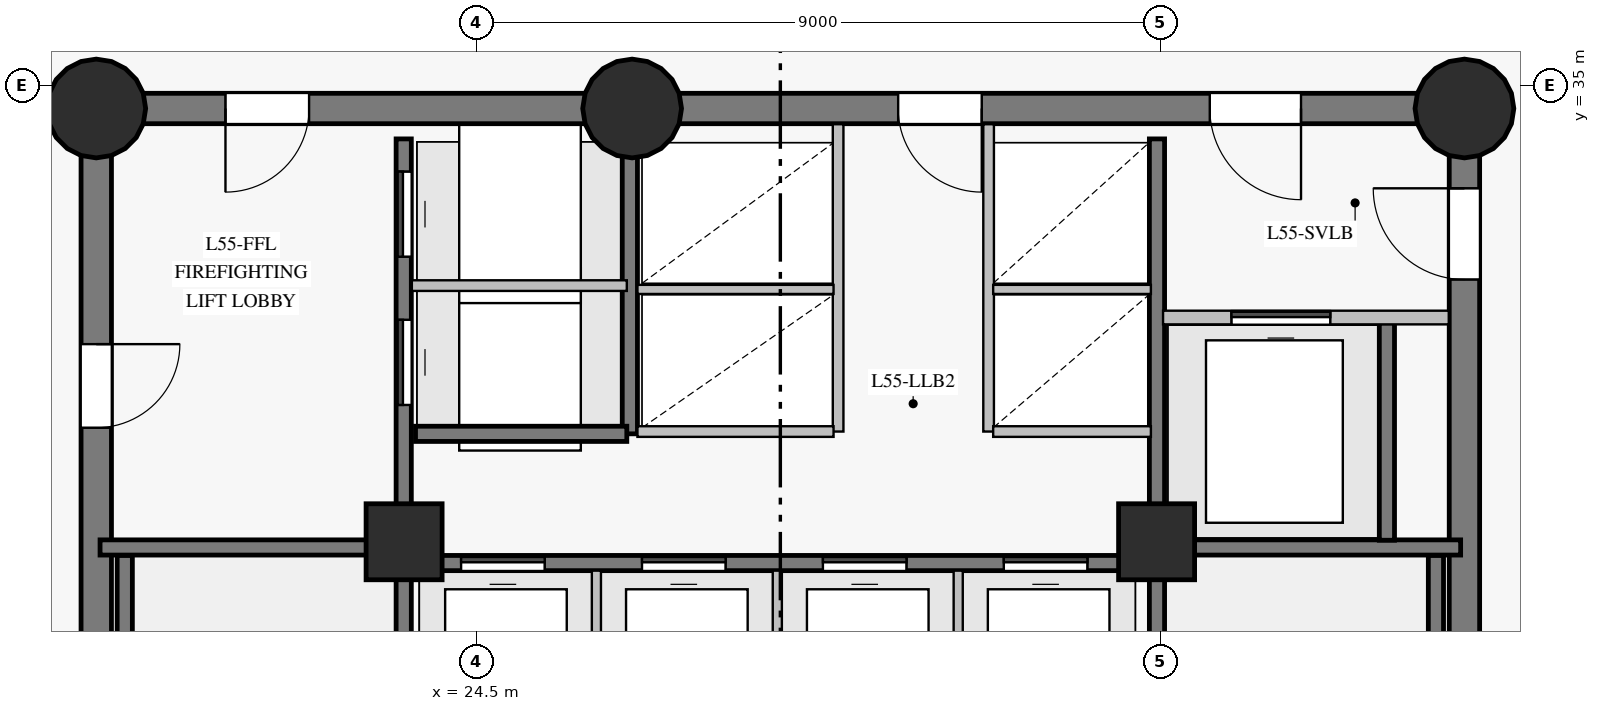
"""IFC4 building model, lengths in metres.
Left out: names, types, materials, properties, quantities, classifications, styles, units other than length and angle.
Written with IfcOpenShell. Run it as: python <this file> out.ifc"""

import sys

from ifc_helpers import new_model, si_unit, direction, frame, frame_2d, origin, origin_with_axes, origin_2d, place, context, subcontext, project, spatial, rectangle, circle, extrude, source, transform, mapped, element, fill, save


model = new_model("IFC4")
c1 = context("Model", 3, precision=1e-05, world=origin(), true_north=direction((0.0, 1.0)))
c2 = subcontext(c1, "Body", "Model", "MODEL_VIEW")
j1 = project(units=[si_unit("LENGTHUNIT", "METRE"), si_unit("PLANEANGLEUNIT", "RADIAN")], contexts=[c1])
p1 = place(None, origin())
s1 = spatial("IfcSite", under=j1, at=p1, CompositionType="ELEMENT")
p2 = place(p1, origin())
s2 = spatial("IfcBuilding", under=s1, at=p2, CompositionType="ELEMENT")
p3 = place(p2, frame((0.0, 0.0, 190.1)))
s3 = spatial("IfcBuildingStorey", under=s2, at=p3, CompositionType="ELEMENT", Elevation=190.1)
p4 = place(p3, frame((37.5, 18.3, 0.0), z_axis=(0.0, 0.0, 1.0), x_axis=(0.0, 1.0, 0.0)))
e1 = element("IfcWall", 1, at=p4, inside=s3, PredefinedType="SHEAR", context=c2, shape_type="SweptSolid", body=[
    extrude(rectangle(XDim=16.4, YDim=0.4, at=frame_2d((8.2, 0.0))), origin(), (0.0, 0.0, 1.0), 2.825),
])
p5 = place(p4, frame((14.15, 0.0, 0.0)))
e2 = element("IfcOpeningElement", 2, at=p5, cuts=e1, PredefinedType="OPENING", context=c2, shape_type="SweptSolid", body=[
    extrude(rectangle(XDim=1.2, YDim=2.15, at=frame_2d((0.6, 1.075))), frame((0.0, 0.21, 0.0), z_axis=(0.0, -1.0, 0.0), x_axis=(1.0, 0.0, 0.0)), (0.0, 0.0, 1.0), 0.42),
])
p6 = place(p3, frame((37.5, 34.7, 0.0), z_axis=(0.0, 0.0, 1.0), x_axis=(-1.0, 0.0, 0.0)))
e3 = element("IfcWall", 3, at=p6, inside=s3, PredefinedType="SHEAR", context=c2, shape_type="SweptSolid", body=[
    extrude(rectangle(XDim=10.95, YDim=0.4, at=frame_2d((5.475, 0.0))), origin(), (0.0, 0.0, 1.0), 2.825),
])
p7 = place(p6, frame((2.15, 0.0, 0.0)))
e4 = element("IfcOpeningElement", 4, at=p7, cuts=e3, PredefinedType="OPENING", context=c2, shape_type="SweptSolid", body=[
    extrude(rectangle(XDim=1.2, YDim=2.15, at=frame_2d((0.6, 1.075))), frame((0.0, 0.21, 0.0), z_axis=(0.0, -1.0, 0.0), x_axis=(1.0, 0.0, 0.0)), (0.0, 0.0, 1.0), 0.42),
])
p8 = place(p6, frame((6.35, 0.0, 0.0)))
e5 = element("IfcOpeningElement", 5, at=p8, cuts=e3, PredefinedType="OPENING", context=c2, shape_type="SweptSolid", body=[
    extrude(rectangle(XDim=1.1, YDim=2.15, at=frame_2d((0.55, 1.075))), frame((0.0, 0.21, 0.0), z_axis=(0.0, -1.0, 0.0), x_axis=(1.0, 0.0, 0.0)), (0.0, 0.0, 1.0), 0.42),
])
p9 = place(p3, frame((26.55, 34.7, 0.0), z_axis=(0.0, 0.0, 1.0), x_axis=(-1.0, 0.0, 0.0)))
e6 = element("IfcWall", 6, at=p9, inside=s3, PredefinedType="SHEAR", context=c2, shape_type="SweptSolid", body=[
    extrude(rectangle(XDim=7.05, YDim=0.4, at=frame_2d((3.525, 0.0))), origin(), (0.0, 0.0, 1.0), 2.825),
])
p10 = place(p9, frame((4.25, 0.0, 0.0)))
e7 = element("IfcOpeningElement", 7, at=p10, cuts=e6, PredefinedType="OPENING", context=c2, shape_type="SweptSolid", body=[
    extrude(rectangle(XDim=1.1, YDim=2.15, at=frame_2d((0.55, 1.075))), frame((0.0, 0.21, 0.0), z_axis=(0.0, -1.0, 0.0), x_axis=(1.0, 0.0, 0.0)), (0.0, 0.0, 1.0), 0.42),
])
p11 = place(p3, frame((19.5, 34.7, 0.0), z_axis=(0.0, 0.0, 1.0), x_axis=(0.0, -1.0, 0.0)))
e8 = element("IfcWall", 8, at=p11, inside=s3, PredefinedType="SHEAR", context=c2, shape_type="SweptSolid", body=[
    extrude(rectangle(XDim=16.4, YDim=0.4, at=frame_2d((8.2, 0.0))), origin(), (0.0, 0.0, 1.0), 2.825),
])
p12 = place(p11, frame((3.1, 0.0, 0.0)))
e9 = element("IfcOpeningElement", 9, at=p12, cuts=e8, PredefinedType="OPENING", context=c2, shape_type="SweptSolid", body=[
    extrude(rectangle(XDim=1.1, YDim=2.15, at=frame_2d((0.55, 1.075))), frame((0.0, 0.21, 0.0), z_axis=(0.0, -1.0, 0.0), x_axis=(1.0, 0.0, 0.0)), (0.0, 0.0, 1.0), 0.42),
])
m1 = source(origin_with_axes(), c2, "Body", "SweptSolid", [
    extrude(circle(Radius=0.65, at=origin_2d()), origin(), (0.0, 0.0, 1.0), 3.05),
])
for number, where, z_axis, x_axis in (
    (10, (19.5, 34.7, 0.0), (0.0, 0.0, 1.0), (1.0, 0.0, 0.0)),
    (11, (26.55, 34.7, 0.0), (0.0, 0.0, 1.0), (1.0, 0.0, 0.0)),
    (12, (37.5, 34.7, 0.0), (0.0, 0.0, 1.0), (1.0, 0.0, 0.0)),
):
    element("IfcColumn", number, at=place(p3, frame(where, z_axis=z_axis, x_axis=x_axis)), inside=s3, PredefinedType="COLUMN", context=c2, shape_type="MappedRepresentation", body=[
        mapped(m1, transform((0.0, 0.0, 0.0), scale=1.0)),
    ])
m2 = source(origin_with_axes(), c2, "Body", "SweptSolid", [
    extrude(rectangle(XDim=1.0, YDim=1.0, at=origin_2d()), origin(), (0.0, 0.0, 1.0), 3.05),
])
for number, where, z_axis, x_axis in (
    (13, (23.55, 29.0, 0.0), (0.0, 0.0, 1.0), (1.0, 0.0, 0.0)),
    (14, (33.45, 29.0, 0.0), (0.0, 0.0, 1.0), (1.0, 0.0, 0.0)),
):
    element("IfcColumn", number, at=place(p3, frame(where, z_axis=z_axis, x_axis=x_axis)), inside=s3, PredefinedType="COLUMN", context=c2, shape_type="MappedRepresentation", body=[
        mapped(m2, transform((0.0, 0.0, 0.0), scale=1.0)),
    ])
p13 = place(p3, frame((23.545, 18.7, 0.0), z_axis=(0.0, 0.0, 1.0), x_axis=(0.0, 1.0, 0.0)))
e15 = element("IfcWall", 15, at=p13, inside=s3, PredefinedType="SHEAR", context=c2, shape_type="SweptSolid", body=[
    extrude(rectangle(XDim=15.6, YDim=0.2, at=frame_2d((7.8, 0.0))), origin(), (0.0, 0.0, 1.0), 2.825),
])
p14 = place(p13, frame((2.75, 0.0, 0.0)))
e16 = element("IfcOpeningElement", 16, at=p14, cuts=e15, PredefinedType="OPENING", context=c2, shape_type="SweptSolid", body=[
    extrude(rectangle(XDim=1.15, YDim=2.15, at=frame_2d((0.575, 1.075))), frame((0.0, 0.11, 0.0), z_axis=(0.0, -1.0, 0.0), x_axis=(1.0, 0.0, 0.0)), (0.0, 0.0, 1.0), 0.22),
])
p15 = place(p13, frame((0.14, 0.0, 0.0)))
e17 = element("IfcOpeningElement", 17, at=p15, cuts=e15, PredefinedType="OPENING", context=c2, shape_type="SweptSolid", body=[
    extrude(rectangle(XDim=0.88, YDim=2.1, at=frame_2d((0.44, 1.05))), frame((0.0, 0.11, 0.0), z_axis=(0.0, -1.0, 0.0), x_axis=(1.0, 0.0, 0.0)), (0.0, 0.0, 1.0), 0.22),
])
p16 = place(p13, frame((1.36, 0.0, 0.0)))
e18 = element("IfcOpeningElement", 18, at=p16, cuts=e15, PredefinedType="OPENING", context=c2, shape_type="SweptSolid", body=[
    extrude(rectangle(XDim=0.88, YDim=2.1, at=frame_2d((0.44, 1.05))), frame((0.0, 0.11, 0.0), z_axis=(0.0, -1.0, 0.0), x_axis=(1.0, 0.0, 0.0)), (0.0, 0.0, 1.0), 0.22),
])
p17 = place(p13, frame((12.1, 0.0, 0.0)))
e19 = element("IfcOpeningElement", 19, at=p17, cuts=e15, PredefinedType="OPENING", context=c2, shape_type="SweptSolid", body=[
    extrude(rectangle(XDim=1.12, YDim=2.15, at=frame_2d((0.56, 1.075))), frame((0.0, 0.11, 0.0), z_axis=(0.0, -1.0, 0.0), x_axis=(1.0, 0.0, 0.0)), (0.0, 0.0, 1.0), 0.22),
])
p18 = place(p13, frame((14.05, 0.0, 0.0)))
e20 = element("IfcOpeningElement", 20, at=p18, cuts=e15, PredefinedType="OPENING", context=c2, shape_type="SweptSolid", body=[
    extrude(rectangle(XDim=1.12, YDim=2.15, at=frame_2d((0.56, 1.075))), frame((0.0, 0.11, 0.0), z_axis=(0.0, -1.0, 0.0), x_axis=(1.0, 0.0, 0.0)), (0.0, 0.0, 1.0), 0.22),
])
p19 = place(p3, frame((33.455, 18.7, 0.0), z_axis=(0.0, 0.0, 1.0), x_axis=(0.0, 1.0, 0.0)))
e21 = element("IfcWall", 21, at=p19, inside=s3, PredefinedType="SHEAR", context=c2, shape_type="SweptSolid", body=[
    extrude(rectangle(XDim=15.6, YDim=0.2, at=frame_2d((7.8, 0.0))), origin(), (0.0, 0.0, 1.0), 2.825),
])
p20 = place(p19, frame((2.75, 0.0, 0.0)))
e22 = element("IfcOpeningElement", 22, at=p20, cuts=e21, PredefinedType="OPENING", context=c2, shape_type="SweptSolid", body=[
    extrude(rectangle(XDim=1.15, YDim=2.15, at=frame_2d((0.575, 1.075))), frame((0.0, 0.11, 0.0), z_axis=(0.0, -1.0, 0.0), x_axis=(1.0, 0.0, 0.0)), (0.0, 0.0, 1.0), 0.22),
])
p21 = place(p19, frame((0.55, 0.0, 0.0)))
e23 = element("IfcOpeningElement", 23, at=p21, cuts=e21, PredefinedType="OPENING", context=c2, shape_type="SweptSolid", body=[
    extrude(rectangle(XDim=0.94, YDim=2.1, at=frame_2d((0.47, 1.05))), frame((0.0, 0.11, 0.0), z_axis=(0.0, -1.0, 0.0), x_axis=(1.0, 0.0, 0.0)), (0.0, 0.0, 1.0), 0.22),
])
p22 = place(p3, frame((23.7, 28.72, 0.0), z_axis=(0.0, 0.0, 1.0), x_axis=(1.0, 0.0, 0.0)))
e24 = element("IfcWall", 24, at=p22, inside=s3, PredefinedType="SHEAR", context=c2, shape_type="SweptSolid", body=[
    extrude(rectangle(XDim=9.6, YDim=0.2, at=frame_2d((4.8, 0.0))), origin(), (0.0, 0.0, 1.0), 2.825),
])
p23 = place(p22, frame((0.6, 0.0, 0.0)))
e25 = element("IfcOpeningElement", 25, at=p23, cuts=e24, PredefinedType="OPENING", context=c2, shape_type="SweptSolid", body=[
    extrude(rectangle(XDim=1.1, YDim=2.15, at=frame_2d((0.55, 1.075))), frame((0.0, 0.11, 0.0), z_axis=(0.0, -1.0, 0.0), x_axis=(1.0, 0.0, 0.0)), (0.0, 0.0, 1.0), 0.22),
])
p24 = place(p22, frame((2.98, 0.0, 0.0)))
e26 = element("IfcOpeningElement", 26, at=p24, cuts=e24, PredefinedType="OPENING", context=c2, shape_type="SweptSolid", body=[
    extrude(rectangle(XDim=1.1, YDim=2.15, at=frame_2d((0.55, 1.075))), frame((0.0, 0.11, 0.0), z_axis=(0.0, -1.0, 0.0), x_axis=(1.0, 0.0, 0.0)), (0.0, 0.0, 1.0), 0.22),
])
p25 = place(p22, frame((5.36, 0.0, 0.0)))
e27 = element("IfcOpeningElement", 27, at=p25, cuts=e24, PredefinedType="OPENING", context=c2, shape_type="SweptSolid", body=[
    extrude(rectangle(XDim=1.1, YDim=2.15, at=frame_2d((0.55, 1.075))), frame((0.0, 0.11, 0.0), z_axis=(0.0, -1.0, 0.0), x_axis=(1.0, 0.0, 0.0)), (0.0, 0.0, 1.0), 0.22),
])
p26 = place(p22, frame((7.74, 0.0, 0.0)))
e28 = element("IfcOpeningElement", 28, at=p26, cuts=e24, PredefinedType="OPENING", context=c2, shape_type="SweptSolid", body=[
    extrude(rectangle(XDim=1.1, YDim=2.15, at=frame_2d((0.55, 1.075))), frame((0.0, 0.11, 0.0), z_axis=(0.0, -1.0, 0.0), x_axis=(1.0, 0.0, 0.0)), (0.0, 0.0, 1.0), 0.22),
])
for number, where, z_axis, x_axis in (
    (29, (19.875, 21.32, 0.0), (0.0, 0.0, 1.0), (0.0, 1.0, 0.0)),
    (30, (37.125, 21.32, 0.0), (0.0, 0.0, 1.0), (0.0, 1.0, 0.0)),
):
    element("IfcWall", number, at=place(p3, frame(where, z_axis=z_axis, x_axis=x_axis)), inside=s3, PredefinedType="SHEAR", context=c2, shape_type="SweptSolid", body=[
        extrude(rectangle(XDim=7.5, YDim=0.2, at=frame_2d((3.75, 0.0))), origin(), (0.0, 0.0, 1.0), 2.825),
    ])
for number, where, z_axis, x_axis in (
    (31, (33.455, 28.925, 0.0), (0.0, 0.0, 1.0), (1.0, 0.0, 0.0)),
    (32, (19.55, 28.925, 0.0), (0.0, 0.0, 1.0), (1.0, 0.0, 0.0)),
):
    element("IfcWall", number, at=place(p3, frame(where, z_axis=z_axis, x_axis=x_axis)), inside=s3, PredefinedType="SHEAR", context=c2, shape_type="SweptSolid", body=[
        extrude(rectangle(XDim=3.995, YDim=0.2, at=frame_2d((1.998, 0.0))), origin(), (0.0, 0.0, 1.0), 2.825),
    ])
p27 = place(p3, frame((26.52, 30.42, 0.0), z_axis=(0.0, 0.0, 1.0), x_axis=(0.0, 1.0, 0.0)))
e33 = element("IfcWall", 33, at=p27, inside=s3, PredefinedType="SHEAR", context=c2, shape_type="SweptSolid", body=[
    extrude(rectangle(XDim=3.86, YDim=0.2, at=frame_2d((1.93, 0.0))), origin(), (0.0, 0.0, 1.0), 2.825),
])
p28 = place(p3, frame((36.48, 29.02, 0.0), z_axis=(0.0, 0.0, 1.0), x_axis=(0.0, 1.0, 0.0)))
e34 = element("IfcWall", 34, at=p28, inside=s3, PredefinedType="SHEAR", context=c2, shape_type="SweptSolid", body=[
    extrude(rectangle(XDim=2.86, YDim=0.2, at=frame_2d((1.43, 0.0))), origin(), (0.0, 0.0, 1.0), 2.825),
])
p29 = place(p3, frame((23.7, 30.42, 0.0), z_axis=(0.0, 0.0, 1.0), x_axis=(1.0, 0.0, 0.0)))
e35 = element("IfcWall", 35, at=p29, inside=s3, PredefinedType="SHEAR", context=c2, shape_type="SweptSolid", body=[
    extrude(rectangle(XDim=2.78, YDim=0.2, at=frame_2d((1.39, 0.0))), origin(), (0.0, 0.0, 1.0), 2.825),
])
for number, where, z_axis, x_axis in (
    (36, (29.26, 30.45, 0.0), (0.0, 0.0, 1.0), (0.0, 1.0, 0.0)),
    (37, (31.24, 30.45, 0.0), (0.0, 0.0, 1.0), (0.0, 1.0, 0.0)),
):
    element("IfcWall", number, at=place(p3, frame(where, z_axis=z_axis, x_axis=x_axis)), inside=s3, PredefinedType="PARTITIONING", context=c2, shape_type="SweptSolid", body=[
        extrude(rectangle(XDim=4.043, YDim=0.14, at=frame_2d((2.021, 0.0))), origin(), (0.0, 0.0, 1.0), 2.825),
    ])
p30 = place(p3, frame((33.535, 31.95, 0.0), z_axis=(0.0, 0.0, 1.0), x_axis=(1.0, 0.0, 0.0)))
e38 = element("IfcWall", 38, at=p30, inside=s3, PredefinedType="PARTITIONING", context=c2, shape_type="SweptSolid", body=[
    extrude(rectangle(XDim=3.759, YDim=0.18, at=frame_2d((1.879, 0.0))), origin(), (0.0, 0.0, 1.0), 2.825),
])
p31 = place(p30, frame((0.9, 0.0, 0.0)))
e39 = element("IfcOpeningElement", 39, at=p31, cuts=e38, PredefinedType="OPENING", context=c2, shape_type="SweptSolid", body=[
    extrude(rectangle(XDim=1.3, YDim=2.2, at=frame_2d((0.65, 1.1))), frame((0.0, 0.1, 0.0), z_axis=(0.0, -1.0, 0.0), x_axis=(1.0, 0.0, 0.0)), (0.0, 0.0, 1.0), 0.2),
])
p32 = place(p3, frame((23.652, 32.37, 0.0), z_axis=(0.0, 0.0, 1.0), x_axis=(1.0, 0.0, 0.0)))
e40 = element("IfcWall", 40, at=p32, inside=s3, PredefinedType="PARTITIONING", context=c2, shape_type="SweptSolid", body=[
    extrude(rectangle(XDim=2.828, YDim=0.14, at=frame_2d((1.414, 0.0))), origin(), (0.0, 0.0, 1.0), 2.825),
])
for number, where, z_axis, x_axis in (
    (41, (26.08, 26.02, 0.0), (0.0, 0.0, 1.0), (0.0, 1.0, 0.0)),
    (42, (28.46, 26.02, 0.0), (0.0, 0.0, 1.0), (0.0, 1.0, 0.0)),
    (43, (30.84, 26.02, 0.0), (0.0, 0.0, 1.0), (0.0, 1.0, 0.0)),
):
    element("IfcWall", number, at=place(p3, frame(where, z_axis=z_axis, x_axis=x_axis)), inside=s3, PredefinedType="PARTITIONING", context=c2, shape_type="SweptSolid", body=[
        extrude(rectangle(XDim=2.6, YDim=0.12, at=frame_2d((1.3, 0.0))), origin(), (0.0, 0.0, 1.0), 2.825),
    ])
p33 = place(p3, frame((26.62, 30.45, 0.0), z_axis=(0.0, 0.0, 1.0), x_axis=(1.0, 0.0, 0.0)))
e44 = element("IfcWall", 44, at=p33, inside=s3, PredefinedType="PARTITIONING", context=c2, shape_type="SweptSolid", body=[
    extrude(rectangle(XDim=2.58, YDim=0.14, at=frame_2d((1.29, 0.0))), origin(), (0.0, 0.0, 1.0), 2.825),
])
p34 = place(p3, frame((26.62, 32.32, 0.0), z_axis=(0.0, 0.0, 1.0), x_axis=(1.0, 0.0, 0.0)))
e45 = element("IfcWall", 45, at=p34, inside=s3, PredefinedType="PARTITIONING", context=c2, shape_type="SweptSolid", body=[
    extrude(rectangle(XDim=2.58, YDim=0.12, at=frame_2d((1.29, 0.0))), origin(), (0.0, 0.0, 1.0), 2.825),
])
p35 = place(p3, frame((31.3, 30.45, 0.0), z_axis=(0.0, 0.0, 1.0), x_axis=(1.0, 0.0, 0.0)))
e46 = element("IfcWall", 46, at=p35, inside=s3, PredefinedType="PARTITIONING", context=c2, shape_type="SweptSolid", body=[
    extrude(rectangle(XDim=2.075, YDim=0.14, at=frame_2d((1.038, 0.0))), origin(), (0.0, 0.0, 1.0), 2.825),
])
p36 = place(p3, frame((31.3, 32.32, 0.0), z_axis=(0.0, 0.0, 1.0), x_axis=(1.0, 0.0, 0.0)))
e47 = element("IfcWall", 47, at=p36, inside=s3, PredefinedType="PARTITIONING", context=c2, shape_type="SweptSolid", body=[
    extrude(rectangle(XDim=2.075, YDim=0.12, at=frame_2d((1.038, 0.0))), origin(), (0.0, 0.0, 1.0), 2.825),
])
m3 = source(origin_with_axes(), c2, "Body", "SweptSolid", [
    extrude(rectangle(XDim=1.1, YDim=2.15, at=frame_2d((0.55, 1.075))), frame((0.0, 0.025, 0.0), z_axis=(0.0, -1.0, 0.0), x_axis=(1.0, 0.0, 0.0)), (0.0, 0.0, 1.0), 0.05),
])
p37 = place(p10, origin())
e48 = element("IfcDoor", 48, at=p37, inside=s3, OperationType="SINGLE_SWING_RIGHT", PredefinedType="DOOR", context=c2, shape_type="MappedRepresentation", body=[
    mapped(m3, transform((0.0, 0.0, 0.0), scale=1.0)),
])
fill(e7, e48)
p38 = place(p12, origin())
e49 = element("IfcDoor", 49, at=p38, inside=s3, OperationType="SINGLE_SWING_LEFT", PredefinedType="DOOR", context=c2, shape_type="MappedRepresentation", body=[
    mapped(m3, transform((0.0, 0.0, 0.0), scale=1.0)),
])
fill(e9, e49)
m4 = source(origin_with_axes(), c2, "Body", "SweptSolid", [
    extrude(rectangle(XDim=1.2, YDim=2.15, at=frame_2d((0.6, 1.075))), frame((0.0, 0.025, 0.0), z_axis=(0.0, -1.0, 0.0), x_axis=(1.0, 0.0, 0.0)), (0.0, 0.0, 1.0), 0.05),
])
p39 = place(p5, origin())
e50 = element("IfcDoor", 50, at=p39, inside=s3, OperationType="SINGLE_SWING_RIGHT", PredefinedType="DOOR", context=c2, shape_type="MappedRepresentation", body=[
    mapped(m4, transform((0.0, 0.0, 0.0), scale=1.0)),
])
fill(e2, e50)
p40 = place(p7, origin())
e51 = element("IfcDoor", 51, at=p40, inside=s3, OperationType="SINGLE_SWING_LEFT", PredefinedType="DOOR", context=c2, shape_type="MappedRepresentation", body=[
    mapped(m4, transform((0.0, 0.0, 0.0), scale=1.0)),
])
fill(e4, e51)
m5 = source(origin_with_axes(), c2, "Body", "SweptSolid", [
    extrude(rectangle(XDim=1.3, YDim=2.2, at=frame_2d((0.65, 1.1))), frame((0.0, 0.025, 0.0), z_axis=(0.0, -1.0, 0.0), x_axis=(1.0, 0.0, 0.0)), (0.0, 0.0, 1.0), 0.05),
])
p41 = place(p31, origin())
e52 = element("IfcDoor", 52, at=p41, inside=s3, OperationType="SLIDING_TO_LEFT", PredefinedType="DOOR", context=c2, shape_type="MappedRepresentation", body=[
    mapped(m5, transform((0.0, 0.0, 0.0), scale=1.0)),
])
fill(e39, e52)
p42 = place(p23, origin())
e53 = element("IfcDoor", 53, at=p42, inside=s3, OperationType="SLIDING_TO_LEFT", PredefinedType="DOOR", context=c2, shape_type="MappedRepresentation", body=[
    mapped(m3, transform((0.0, 0.0, 0.0), scale=1.0)),
])
fill(e25, e53)
p43 = place(p24, origin())
e54 = element("IfcDoor", 54, at=p43, inside=s3, OperationType="SLIDING_TO_RIGHT", PredefinedType="DOOR", context=c2, shape_type="MappedRepresentation", body=[
    mapped(m3, transform((0.0, 0.0, 0.0), scale=1.0)),
])
fill(e26, e54)
p44 = place(p25, origin())
e55 = element("IfcDoor", 55, at=p44, inside=s3, OperationType="SLIDING_TO_LEFT", PredefinedType="DOOR", context=c2, shape_type="MappedRepresentation", body=[
    mapped(m3, transform((0.0, 0.0, 0.0), scale=1.0)),
])
fill(e27, e55)
p45 = place(p26, origin())
e56 = element("IfcDoor", 56, at=p45, inside=s3, OperationType="SLIDING_TO_RIGHT", PredefinedType="DOOR", context=c2, shape_type="MappedRepresentation", body=[
    mapped(m3, transform((0.0, 0.0, 0.0), scale=1.0)),
])
fill(e28, e56)
p46 = place(p8, origin())
e57 = element("IfcDoor", 57, at=p46, inside=s3, OperationType="SINGLE_SWING_LEFT", PredefinedType="DOOR", context=c2, shape_type="MappedRepresentation", body=[
    mapped(m3, transform((0.0, 0.0, 0.0), scale=1.0)),
])
fill(e5, e57)
m6 = source(origin_with_axes(), c2, "Body", "SweptSolid", [
    extrude(rectangle(XDim=1.12, YDim=2.15, at=frame_2d((0.56, 1.075))), frame((0.0, 0.025, 0.0), z_axis=(0.0, -1.0, 0.0), x_axis=(1.0, 0.0, 0.0)), (0.0, 0.0, 1.0), 0.05),
])
p47 = place(p17, origin())
e58 = element("IfcDoor", 58, at=p47, inside=s3, OperationType="SLIDING_TO_LEFT", PredefinedType="DOOR", context=c2, shape_type="MappedRepresentation", body=[
    mapped(m6, transform((0.0, 0.0, 0.0), scale=1.0)),
])
fill(e19, e58)
p48 = place(p18, origin())
e59 = element("IfcDoor", 59, at=p48, inside=s3, OperationType="SLIDING_TO_RIGHT", PredefinedType="DOOR", context=c2, shape_type="MappedRepresentation", body=[
    mapped(m6, transform((0.0, 0.0, 0.0), scale=1.0)),
])
fill(e20, e59)
save(model, sys.argv[1])
